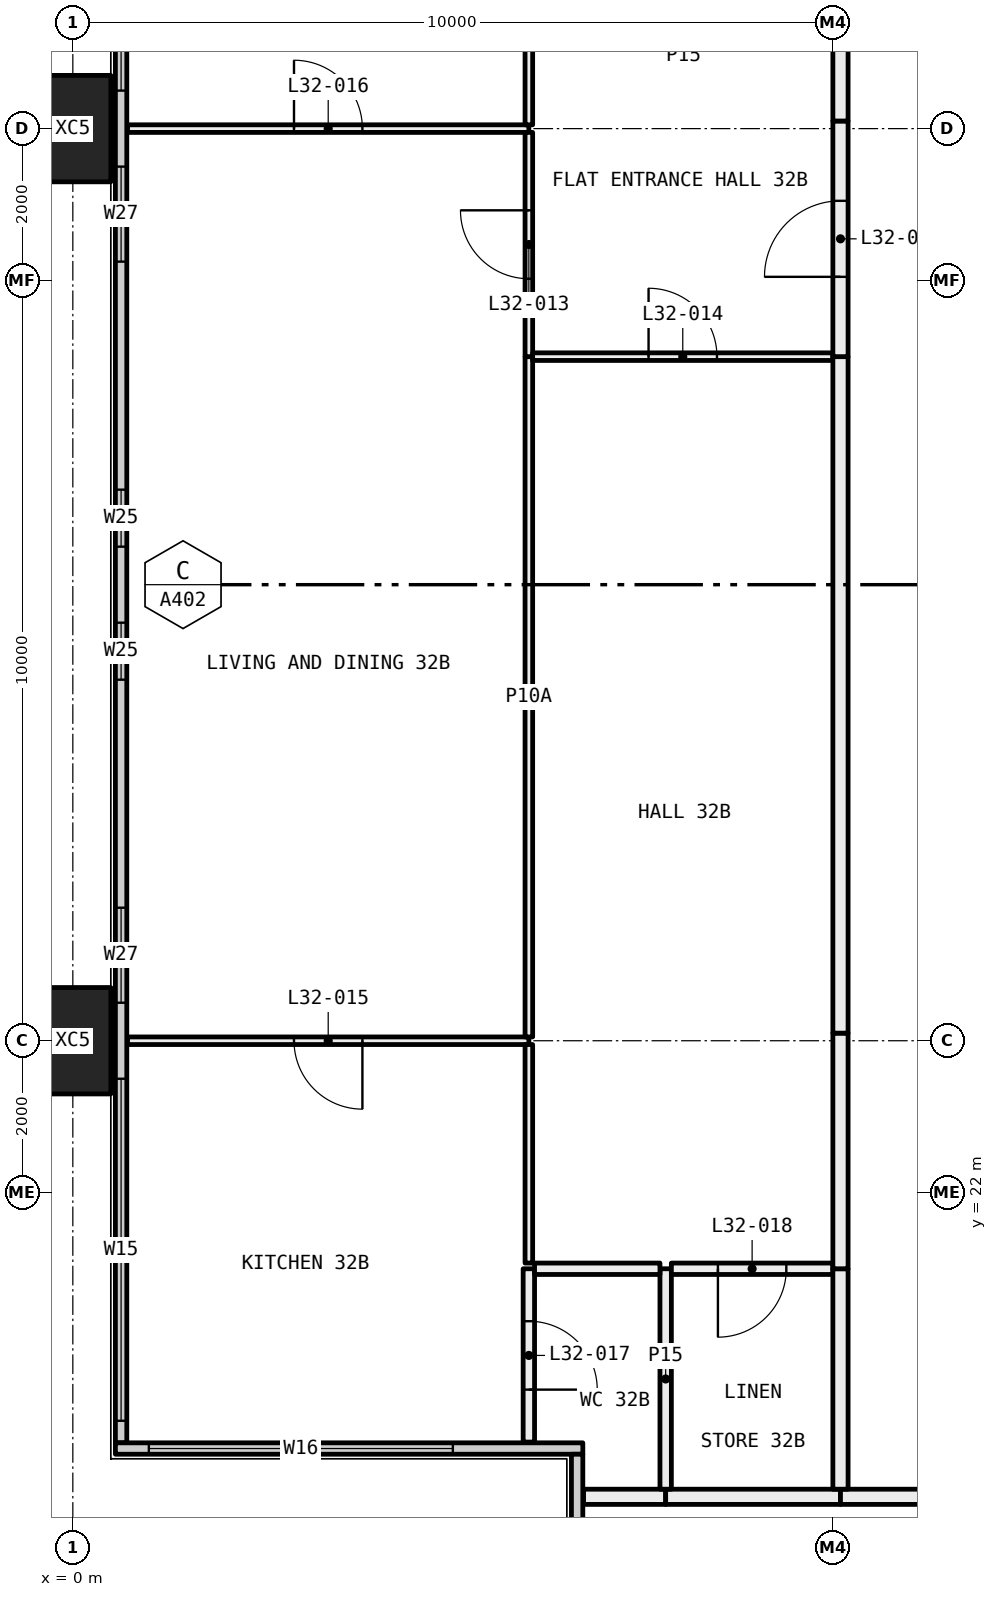
"""IFC4 building model, lengths in metres.
Left out: names, types, materials, properties, quantities, classifications, styles, units other than length and angle.
Written with IfcOpenShell. Run it as: python <this file> out.ifc"""

import sys

from ifc_helpers import new_model, si_unit, direction, frame, frame_2d, origin, origin_2d, place, context, subcontext, project, spatial, rectangle, hollow_rectangle, extrude, element, fill, save


model = new_model("IFC4")
c1 = context("Model", 3, precision=1e-05, world=origin(), true_north=direction((0.0, 1.0)))
c2 = subcontext(c1, "Body", "Model", "MODEL_VIEW")
j1 = project(units=[si_unit("LENGTHUNIT", "METRE"), si_unit("PLANEANGLEUNIT", "RADIAN")], contexts=[c1])
p1 = place(None, origin())
s1 = spatial("IfcSite", under=j1, at=p1, CompositionType="ELEMENT")
p2 = place(p1, origin())
s2 = spatial("IfcBuilding", under=s1, at=p2, CompositionType="ELEMENT")
p3 = place(p2, frame((0.0, 0.0, 124.2)))
s3 = spatial("IfcBuildingStorey", under=s2, at=p3, CompositionType="ELEMENT", Elevation=124.2)
for number, where, z_axis, x_axis in (
    (1, (0.0, 24.0, -0.4), (0.0, 0.0, 1.0), (0.0, 1.0, 0.0)),
    (2, (0.0, 36.0, -0.4), (0.0, 0.0, 1.0), (0.0, 1.0, 0.0)),
):
    element("IfcColumn", number, at=place(p3, frame(where, z_axis=z_axis, x_axis=x_axis)), inside=s3, PredefinedType="COLUMN", context=c2, shape_type="SweptSolid", body=[
        extrude(hollow_rectangle(XDim=1.4, YDim=1.0, WallThickness=0.055, at=origin_2d()), origin(), (0.0, 0.0, 1.0), 3.45),
    ])
p4 = place(p3, frame((0.635, 18.71, 0.0), z_axis=(0.0, 0.0, 1.0), x_axis=(0.0, 1.0, 0.0)))
e3 = element("IfcWall", 3, at=p4, inside=s3, PredefinedType="ELEMENTEDWALL", context=c2, shape_type="SweptSolid", body=[
    extrude(rectangle(XDim=22.58, YDim=0.15, at=frame_2d((11.29, 0.0))), origin(), (0.0, 0.0, 1.0), 3.05),
])
p5 = place(p4, frame((0.29, 0.0, 0.45)))
e4 = element("IfcOpeningElement", 4, at=p5, cuts=e3, PredefinedType="OPENING", context=c2, shape_type="SweptSolid", body=[
    extrude(rectangle(XDim=4.5, YDim=2.55, at=frame_2d((2.25, 1.275))), frame((0.0, 0.085, 0.0), z_axis=(0.0, -1.0, 0.0), x_axis=(1.0, 0.0, 0.0)), (0.0, 0.0, 1.0), 0.17),
])
p6 = place(p4, frame((5.79, 0.0, 0.45)))
e5 = element("IfcOpeningElement", 5, at=p6, cuts=e3, PredefinedType="OPENING", context=c2, shape_type="SweptSolid", body=[
    extrude(rectangle(XDim=1.25, YDim=2.55, at=frame_2d((0.625, 1.275))), frame((0.0, 0.085, 0.0), z_axis=(0.0, -1.0, 0.0), x_axis=(1.0, 0.0, 0.0)), (0.0, 0.0, 1.0), 0.17),
])
p7 = place(p4, frame((10.04, 0.0, 0.45)))
e6 = element("IfcOpeningElement", 6, at=p7, cuts=e3, PredefinedType="OPENING", context=c2, shape_type="SweptSolid", body=[
    extrude(rectangle(XDim=0.75, YDim=2.55, at=frame_2d((0.375, 1.275))), frame((0.0, 0.085, 0.0), z_axis=(0.0, -1.0, 0.0), x_axis=(1.0, 0.0, 0.0)), (0.0, 0.0, 1.0), 0.17),
])
p8 = place(p4, frame((11.79, 0.0, 0.45)))
e7 = element("IfcOpeningElement", 7, at=p8, cuts=e3, PredefinedType="OPENING", context=c2, shape_type="SweptSolid", body=[
    extrude(rectangle(XDim=0.75, YDim=2.55, at=frame_2d((0.375, 1.275))), frame((0.0, 0.085, 0.0), z_axis=(0.0, -1.0, 0.0), x_axis=(1.0, 0.0, 0.0)), (0.0, 0.0, 1.0), 0.17),
])
p9 = place(p4, frame((15.54, 0.0, 0.45)))
e8 = element("IfcOpeningElement", 8, at=p9, cuts=e3, PredefinedType="OPENING", context=c2, shape_type="SweptSolid", body=[
    extrude(rectangle(XDim=1.25, YDim=2.55, at=frame_2d((0.625, 1.275))), frame((0.0, 0.085, 0.0), z_axis=(0.0, -1.0, 0.0), x_axis=(1.0, 0.0, 0.0)), (0.0, 0.0, 1.0), 0.17),
])
p10 = place(p4, frame((17.79, 0.0, 0.45)))
e9 = element("IfcOpeningElement", 9, at=p10, cuts=e3, PredefinedType="OPENING", context=c2, shape_type="SweptSolid", body=[
    extrude(rectangle(XDim=4.5, YDim=2.55, at=frame_2d((2.25, 1.275))), frame((0.0, 0.085, 0.0), z_axis=(0.0, -1.0, 0.0), x_axis=(1.0, 0.0, 0.0)), (0.0, 0.0, 1.0), 0.17),
])
p11 = place(p3, frame((0.56, 18.635, 0.0), z_axis=(0.0, 0.0, 1.0), x_axis=(1.0, 0.0, 0.0)))
e10 = element("IfcWall", 10, at=p11, inside=s3, PredefinedType="ELEMENTEDWALL", context=c2, shape_type="SweptSolid", body=[
    extrude(rectangle(XDim=6.15, YDim=0.15, at=frame_2d((3.075, 0.0))), origin(), (0.0, 0.0, 1.0), 3.05),
])
p12 = place(p11, frame((0.44, 0.0, 0.45)))
e11 = element("IfcOpeningElement", 11, at=p12, cuts=e10, PredefinedType="OPENING", context=c2, shape_type="SweptSolid", body=[
    extrude(rectangle(XDim=4.0, YDim=2.55, at=frame_2d((2.0, 1.275))), frame((0.0, 0.085, 0.0), z_axis=(0.0, -1.0, 0.0), x_axis=(1.0, 0.0, 0.0)), (0.0, 0.0, 1.0), 0.17),
])
p13 = place(p3, frame((6.635, 12.71, 0.0), z_axis=(0.0, 0.0, 1.0), x_axis=(0.0, 1.0, 0.0)))
e12 = element("IfcWall", 12, at=p13, inside=s3, PredefinedType="ELEMENTEDWALL", context=c2, shape_type="SweptSolid", body=[
    extrude(rectangle(XDim=5.85, YDim=0.15, at=frame_2d((2.925, 0.0))), origin(), (0.0, 0.0, 1.0), 3.05),
])
p14 = place(p13, frame((0.29, 0.0, 0.45)))
e13 = element("IfcOpeningElement", 13, at=p14, cuts=e12, PredefinedType="OPENING", context=c2, shape_type="SweptSolid", body=[
    extrude(rectangle(XDim=4.0, YDim=2.55, at=frame_2d((2.0, 1.275))), frame((0.0, 0.085, 0.0), z_axis=(0.0, -1.0, 0.0), x_axis=(1.0, 0.0, 0.0)), (0.0, 0.0, 1.0), 0.17),
])
p15 = place(p3, frame((7.8, 18.0, 0.0), z_axis=(0.0, 0.0, 1.0), x_axis=(-1.0, 0.0, 0.0)))
e14 = element("IfcWall", 14, at=p15, inside=s3, PredefinedType="PARTITIONING", context=c2, shape_type="SweptSolid", body=[
    extrude(rectangle(XDim=1.08, YDim=0.2, at=frame_2d((0.54, 0.0))), origin(), (0.0, 0.0, 1.0), 3.05),
])
p16 = place(p3, frame((10.1, 18.0, 0.0), z_axis=(0.0, 0.0, 1.0), x_axis=(-1.0, 0.0, 0.0)))
e15 = element("IfcWall", 15, at=p16, inside=s3, PredefinedType="PARTITIONING", context=c2, shape_type="SweptSolid", body=[
    extrude(rectangle(XDim=2.3, YDim=0.2, at=frame_2d((1.15, 0.0))), origin(), (0.0, 0.0, 1.0), 3.05),
])
p17 = place(p3, frame((12.0, 18.0, 0.0), z_axis=(0.0, 0.0, 1.0), x_axis=(-1.0, 0.0, 0.0)))
e16 = element("IfcWall", 16, at=p17, inside=s3, PredefinedType="PARTITIONING", context=c2, shape_type="SweptSolid", body=[
    extrude(rectangle(XDim=1.9, YDim=0.2, at=frame_2d((0.95, 0.0))), origin(), (0.0, 0.0, 1.0), 3.05),
])
p18 = place(p3, frame((6.0, 24.0, 0.0), z_axis=(0.0, 0.0, 1.0), x_axis=(-1.0, 0.0, 0.0)))
e17 = element("IfcWall", 17, at=p18, inside=s3, PredefinedType="PARTITIONING", context=c2, shape_type="SweptSolid", body=[
    extrude(rectangle(XDim=5.28, YDim=0.1, at=frame_2d((2.64, 0.0))), origin(), (0.0, 0.0, 1.0), 2.45),
])
p19 = place(p18, frame((2.19, 0.0, 0.0)))
e18 = element("IfcOpeningElement", 18, at=p19, cuts=e17, PredefinedType="OPENING", context=c2, shape_type="SweptSolid", body=[
    extrude(rectangle(XDim=0.9, YDim=2.1, at=frame_2d((0.45, 1.05))), frame((0.0, 0.06, 0.0), z_axis=(0.0, -1.0, 0.0), x_axis=(1.0, 0.0, 0.0)), (0.0, 0.0, 1.0), 0.12),
])
p20 = place(p3, frame((6.0, 18.72, 0.0), z_axis=(0.0, 0.0, 1.0), x_axis=(0.0, 1.0, 0.0)))
e19 = element("IfcWall", 19, at=p20, inside=s3, PredefinedType="PARTITIONING", context=c2, shape_type="SweptSolid", body=[
    extrude(rectangle(XDim=2.28, YDim=0.15, at=frame_2d((1.14, 0.0))), origin(), (0.0, 0.0, 1.0), 3.05),
])
p21 = place(p20, frame((0.69, 0.0, 0.0)))
e20 = element("IfcOpeningElement", 20, at=p21, cuts=e19, PredefinedType="OPENING", context=c2, shape_type="SweptSolid", body=[
    extrude(rectangle(XDim=0.9, YDim=2.1, at=frame_2d((0.45, 1.05))), frame((0.0, 0.085, 0.0), z_axis=(0.0, -1.0, 0.0), x_axis=(1.0, 0.0, 0.0)), (0.0, 0.0, 1.0), 0.17),
])
p22 = place(p3, frame((6.0, 21.075, 0.0), z_axis=(0.0, 0.0, 1.0), x_axis=(0.0, 1.0, 0.0)))
e21 = element("IfcWall", 21, at=p22, inside=s3, PredefinedType="PARTITIONING", context=c2, shape_type="SweptSolid", body=[
    extrude(rectangle(XDim=2.875, YDim=0.1, at=frame_2d((1.438, 0.0))), origin(), (0.0, 0.0, 1.0), 2.45),
])
p23 = place(p3, frame((6.0, 36.0, 0.0), z_axis=(0.0, 0.0, 1.0), x_axis=(-1.0, 0.0, 0.0)))
e22 = element("IfcWall", 22, at=p23, inside=s3, PredefinedType="PARTITIONING", context=c2, shape_type="SweptSolid", body=[
    extrude(rectangle(XDim=5.28, YDim=0.1, at=frame_2d((2.64, 0.0))), origin(), (0.0, 0.0, 1.0), 2.45),
])
p24 = place(p23, frame((2.19, 0.0, 0.0)))
e23 = element("IfcOpeningElement", 23, at=p24, cuts=e22, PredefinedType="OPENING", context=c2, shape_type="SweptSolid", body=[
    extrude(rectangle(XDim=0.9, YDim=2.1, at=frame_2d((0.45, 1.05))), frame((0.0, 0.06, 0.0), z_axis=(0.0, -1.0, 0.0), x_axis=(1.0, 0.0, 0.0)), (0.0, 0.0, 1.0), 0.12),
])
p25 = place(p3, frame((6.0, 24.05, 0.0), z_axis=(0.0, 0.0, 1.0), x_axis=(0.0, 1.0, 0.0)))
e24 = element("IfcWall", 24, at=p25, inside=s3, PredefinedType="PARTITIONING", context=c2, shape_type="SweptSolid", body=[
    extrude(rectangle(XDim=8.95, YDim=0.1, at=frame_2d((4.475, 0.0))), origin(), (0.0, 0.0, 1.0), 2.45),
])
p26 = place(p3, frame((6.0, 33.0, 0.0), z_axis=(0.0, 0.0, 1.0), x_axis=(0.0, 1.0, 0.0)))
e25 = element("IfcWall", 25, at=p26, inside=s3, PredefinedType="PARTITIONING", context=c2, shape_type="SweptSolid", body=[
    extrude(rectangle(XDim=2.95, YDim=0.1, at=frame_2d((1.475, 0.0))), origin(), (0.0, 0.0, 1.0), 2.45),
])
p27 = place(p26, frame((1.025, 0.0, 0.0)))
e26 = element("IfcOpeningElement", 26, at=p27, cuts=e25, PredefinedType="OPENING", context=c2, shape_type="SweptSolid", body=[
    extrude(rectangle(XDim=0.9, YDim=2.1, at=frame_2d((0.45, 1.05))), frame((0.0, 0.06, 0.0), z_axis=(0.0, -1.0, 0.0), x_axis=(1.0, 0.0, 0.0)), (0.0, 0.0, 1.0), 0.12),
])
p28 = place(p3, frame((6.0, 36.05, 0.0), z_axis=(0.0, 0.0, 1.0), x_axis=(0.0, 1.0, 0.0)))
e27 = element("IfcWall", 27, at=p28, inside=s3, PredefinedType="PARTITIONING", context=c2, shape_type="SweptSolid", body=[
    extrude(rectangle(XDim=1.375, YDim=0.1, at=frame_2d((0.688, 0.0))), origin(), (0.0, 0.0, 1.0), 2.45),
])
p29 = place(p3, frame((7.8, 18.1, 0.0), z_axis=(0.0, 0.0, 1.0), x_axis=(0.0, 1.0, 0.0)))
e28 = element("IfcWall", 28, at=p29, inside=s3, PredefinedType="PARTITIONING", context=c2, shape_type="SweptSolid", body=[
    extrude(rectangle(XDim=2.9, YDim=0.15, at=frame_2d((1.45, 0.0))), origin(), (0.0, 0.0, 1.0), 3.05),
])
p30 = place(p3, frame((7.725, 21.0, 0.0), z_axis=(0.0, 0.0, 1.0), x_axis=(-1.0, 0.0, 0.0)))
e29 = element("IfcWall", 29, at=p30, inside=s3, PredefinedType="PARTITIONING", context=c2, shape_type="SweptSolid", body=[
    extrude(rectangle(XDim=1.65, YDim=0.15, at=frame_2d((0.825, 0.0))), origin(), (0.0, 0.0, 1.0), 3.05),
])
p31 = place(p3, frame((10.0, 21.0, 0.0), z_axis=(0.0, 0.0, 1.0), x_axis=(-1.0, 0.0, 0.0)))
e30 = element("IfcWall", 30, at=p31, inside=s3, PredefinedType="PARTITIONING", context=c2, shape_type="SweptSolid", body=[
    extrude(rectangle(XDim=2.125, YDim=0.15, at=frame_2d((1.062, 0.0))), origin(), (0.0, 0.0, 1.0), 3.05),
])
p32 = place(p31, frame((0.613, 0.0, 0.0)))
e31 = element("IfcOpeningElement", 31, at=p32, cuts=e30, PredefinedType="OPENING", context=c2, shape_type="SweptSolid", body=[
    extrude(rectangle(XDim=0.9, YDim=2.1, at=frame_2d((0.45, 1.05))), frame((0.0, 0.085, 0.0), z_axis=(0.0, -1.0, 0.0), x_axis=(1.0, 0.0, 0.0)), (0.0, 0.0, 1.0), 0.17),
])
p33 = place(p3, frame((10.1, 18.1, 0.0), z_axis=(0.0, 0.0, 1.0), x_axis=(0.0, 1.0, 0.0)))
e32 = element("IfcWall", 32, at=p33, inside=s3, PredefinedType="PARTITIONING", context=c2, shape_type="SweptSolid", body=[
    extrude(rectangle(XDim=2.9, YDim=0.2, at=frame_2d((1.45, 0.0))), origin(), (0.0, 0.0, 1.0), 3.05),
])
p34 = place(p3, frame((10.0, 33.0, 0.0), z_axis=(0.0, 0.0, 1.0), x_axis=(-1.0, 0.0, 0.0)))
e33 = element("IfcWall", 33, at=p34, inside=s3, PredefinedType="PARTITIONING", context=c2, shape_type="SweptSolid", body=[
    extrude(rectangle(XDim=3.95, YDim=0.1, at=frame_2d((1.975, 0.0))), origin(), (0.0, 0.0, 1.0), 3.05),
])
p35 = place(p34, frame((1.525, 0.0, 0.0)))
e34 = element("IfcOpeningElement", 34, at=p35, cuts=e33, PredefinedType="OPENING", context=c2, shape_type="SweptSolid", body=[
    extrude(rectangle(XDim=0.9, YDim=2.1, at=frame_2d((0.45, 1.05))), frame((0.0, 0.06, 0.0), z_axis=(0.0, -1.0, 0.0), x_axis=(1.0, 0.0, 0.0)), (0.0, 0.0, 1.0), 0.12),
])
p36 = place(p3, frame((10.1, 21.0, 0.0), z_axis=(0.0, 0.0, 1.0), x_axis=(0.0, 1.0, 0.0)))
e35 = element("IfcWall", 35, at=p36, inside=s3, PredefinedType="PARTITIONING", context=c2, shape_type="SweptSolid", body=[
    extrude(rectangle(XDim=3.1, YDim=0.2, at=frame_2d((1.55, 0.0))), origin(), (0.0, 0.0, 1.0), 2.45),
])
p37 = place(p3, frame((10.1, 24.1, 0.0), z_axis=(0.0, 0.0, 1.0), x_axis=(0.0, 1.0, 0.0)))
e36 = element("IfcWall", 36, at=p37, inside=s3, PredefinedType="PARTITIONING", context=c2, shape_type="SweptSolid", body=[
    extrude(rectangle(XDim=8.9, YDim=0.2, at=frame_2d((4.45, 0.0))), origin(), (0.0, 0.0, 1.0), 3.05),
])
p38 = place(p3, frame((10.1, 33.0, 0.0), z_axis=(0.0, 0.0, 1.0), x_axis=(0.0, 1.0, 0.0)))
e37 = element("IfcWall", 37, at=p38, inside=s3, PredefinedType="PARTITIONING", context=c2, shape_type="SweptSolid", body=[
    extrude(rectangle(XDim=3.1, YDim=0.2, at=frame_2d((1.55, 0.0))), origin(), (0.0, 0.0, 1.0), 2.45),
])
p39 = place(p38, frame((1.05, 0.0, 0.0)))
e38 = element("IfcOpeningElement", 38, at=p39, cuts=e37, PredefinedType="OPENING", context=c2, shape_type="SweptSolid", body=[
    extrude(rectangle(XDim=1.0, YDim=2.1, at=frame_2d((0.5, 1.05))), frame((0.0, 0.11, 0.0), z_axis=(0.0, -1.0, 0.0), x_axis=(1.0, 0.0, 0.0)), (0.0, 0.0, 1.0), 0.22),
])
p40 = place(p3, frame((10.1, 36.1, 0.0), z_axis=(0.0, 0.0, 1.0), x_axis=(0.0, 1.0, 0.0)))
e39 = element("IfcWall", 39, at=p40, inside=s3, PredefinedType="PARTITIONING", context=c2, shape_type="SweptSolid", body=[
    extrude(rectangle(XDim=1.4, YDim=0.2, at=frame_2d((0.7, 0.0))), origin(), (0.0, 0.0, 1.0), 3.05),
])
p41 = place(p5, origin())
e40 = element("IfcWindow", 40, at=p41, inside=s3, PartitioningType="SINGLE_PANEL", PredefinedType="WINDOW", context=c2, shape_type="SweptSolid", body=[
    extrude(rectangle(XDim=4.5, YDim=2.55, at=frame_2d((2.25, 1.275))), frame((0.0, 0.03, 0.0), z_axis=(0.0, -1.0, 0.0), x_axis=(1.0, 0.0, 0.0)), (0.0, 0.0, 1.0), 0.06),
])
fill(e4, e40)
p42 = place(p6, origin())
e41 = element("IfcWindow", 41, at=p42, inside=s3, PartitioningType="SINGLE_PANEL", PredefinedType="WINDOW", context=c2, shape_type="SweptSolid", body=[
    extrude(rectangle(XDim=1.25, YDim=2.55, at=frame_2d((0.625, 1.275))), frame((0.0, 0.03, 0.0), z_axis=(0.0, -1.0, 0.0), x_axis=(1.0, 0.0, 0.0)), (0.0, 0.0, 1.0), 0.06),
])
fill(e5, e41)
p43 = place(p7, origin())
e42 = element("IfcWindow", 42, at=p43, inside=s3, PartitioningType="SINGLE_PANEL", PredefinedType="WINDOW", context=c2, shape_type="SweptSolid", body=[
    extrude(rectangle(XDim=0.75, YDim=2.55, at=frame_2d((0.375, 1.275))), frame((0.0, 0.03, 0.0), z_axis=(0.0, -1.0, 0.0), x_axis=(1.0, 0.0, 0.0)), (0.0, 0.0, 1.0), 0.06),
])
fill(e6, e42)
p44 = place(p8, origin())
e43 = element("IfcWindow", 43, at=p44, inside=s3, PartitioningType="SINGLE_PANEL", PredefinedType="WINDOW", context=c2, shape_type="SweptSolid", body=[
    extrude(rectangle(XDim=0.75, YDim=2.55, at=frame_2d((0.375, 1.275))), frame((0.0, 0.03, 0.0), z_axis=(0.0, -1.0, 0.0), x_axis=(1.0, 0.0, 0.0)), (0.0, 0.0, 1.0), 0.06),
])
fill(e7, e43)
p45 = place(p9, origin())
e44 = element("IfcWindow", 44, at=p45, inside=s3, PartitioningType="SINGLE_PANEL", PredefinedType="WINDOW", context=c2, shape_type="SweptSolid", body=[
    extrude(rectangle(XDim=1.25, YDim=2.55, at=frame_2d((0.625, 1.275))), frame((0.0, 0.03, 0.0), z_axis=(0.0, -1.0, 0.0), x_axis=(1.0, 0.0, 0.0)), (0.0, 0.0, 1.0), 0.06),
])
fill(e8, e44)
p46 = place(p10, origin())
e45 = element("IfcWindow", 45, at=p46, inside=s3, PartitioningType="SINGLE_PANEL", PredefinedType="WINDOW", context=c2, shape_type="SweptSolid", body=[
    extrude(rectangle(XDim=4.5, YDim=2.55, at=frame_2d((2.25, 1.275))), frame((0.0, 0.03, 0.0), z_axis=(0.0, -1.0, 0.0), x_axis=(1.0, 0.0, 0.0)), (0.0, 0.0, 1.0), 0.06),
])
fill(e9, e45)
p47 = place(p12, origin())
e46 = element("IfcWindow", 46, at=p47, inside=s3, PartitioningType="SINGLE_PANEL", PredefinedType="WINDOW", context=c2, shape_type="SweptSolid", body=[
    extrude(rectangle(XDim=4.0, YDim=2.55, at=frame_2d((2.0, 1.275))), frame((0.0, 0.03, 0.0), z_axis=(0.0, -1.0, 0.0), x_axis=(1.0, 0.0, 0.0)), (0.0, 0.0, 1.0), 0.06),
])
fill(e11, e46)
p48 = place(p39, origin())
e47 = element("IfcDoor", 47, at=p48, inside=s3, OperationType="SINGLE_SWING_RIGHT", PredefinedType="DOOR", context=c2, shape_type="SweptSolid", body=[
    extrude(rectangle(XDim=1.0, YDim=2.1, at=frame_2d((0.5, 1.05))), frame((0.0, 0.025, 0.0), z_axis=(0.0, -1.0, 0.0), x_axis=(1.0, 0.0, 0.0)), (0.0, 0.0, 1.0), 0.05),
])
fill(e38, e47)
p49 = place(p27, origin())
e48 = element("IfcDoor", 48, at=p49, inside=s3, OperationType="SINGLE_SWING_LEFT", PredefinedType="DOOR", context=c2, shape_type="SweptSolid", body=[
    extrude(rectangle(XDim=0.9, YDim=2.1, at=frame_2d((0.45, 1.05))), frame((0.0, 0.025, 0.0), z_axis=(0.0, -1.0, 0.0), x_axis=(1.0, 0.0, 0.0)), (0.0, 0.0, 1.0), 0.05),
])
fill(e26, e48)
p50 = place(p35, frame((0.9, 0.0, 0.0), x_axis=(-1.0, 0.0, 0.0)))
e49 = element("IfcDoor", 49, at=p50, inside=s3, OperationType="SINGLE_SWING_RIGHT", PredefinedType="DOOR", context=c2, shape_type="SweptSolid", body=[
    extrude(rectangle(XDim=0.9, YDim=2.1, at=frame_2d((0.45, 1.05))), frame((0.0, 0.025, 0.0), z_axis=(0.0, -1.0, 0.0), x_axis=(1.0, 0.0, 0.0)), (0.0, 0.0, 1.0), 0.05),
])
fill(e34, e49)
p51 = place(p19, origin())
e50 = element("IfcDoor", 50, at=p51, inside=s3, OperationType="SINGLE_SWING_RIGHT", PredefinedType="DOOR", context=c2, shape_type="SweptSolid", body=[
    extrude(rectangle(XDim=0.9, YDim=2.1, at=frame_2d((0.45, 1.05))), frame((0.0, 0.025, 0.0), z_axis=(0.0, -1.0, 0.0), x_axis=(1.0, 0.0, 0.0)), (0.0, 0.0, 1.0), 0.05),
])
fill(e18, e50)
p52 = place(p24, frame((0.9, 0.0, 0.0), x_axis=(-1.0, 0.0, 0.0)))
e51 = element("IfcDoor", 51, at=p52, inside=s3, OperationType="SINGLE_SWING_RIGHT", PredefinedType="DOOR", context=c2, shape_type="SweptSolid", body=[
    extrude(rectangle(XDim=0.9, YDim=2.1, at=frame_2d((0.45, 1.05))), frame((0.0, 0.025, 0.0), z_axis=(0.0, -1.0, 0.0), x_axis=(1.0, 0.0, 0.0)), (0.0, 0.0, 1.0), 0.05),
])
fill(e23, e51)
p53 = place(p21, frame((0.9, 0.0, 0.0), x_axis=(-1.0, 0.0, 0.0)))
e52 = element("IfcDoor", 52, at=p53, inside=s3, OperationType="SINGLE_SWING_LEFT", PredefinedType="DOOR", context=c2, shape_type="SweptSolid", body=[
    extrude(rectangle(XDim=0.9, YDim=2.1, at=frame_2d((0.45, 1.05))), frame((0.0, 0.025, 0.0), z_axis=(0.0, -1.0, 0.0), x_axis=(1.0, 0.0, 0.0)), (0.0, 0.0, 1.0), 0.05),
])
fill(e20, e52)
p54 = place(p32, origin())
e53 = element("IfcDoor", 53, at=p54, inside=s3, OperationType="SINGLE_SWING_LEFT", PredefinedType="DOOR", context=c2, shape_type="SweptSolid", body=[
    extrude(rectangle(XDim=0.9, YDim=2.1, at=frame_2d((0.45, 1.05))), frame((0.0, 0.025, 0.0), z_axis=(0.0, -1.0, 0.0), x_axis=(1.0, 0.0, 0.0)), (0.0, 0.0, 1.0), 0.05),
])
fill(e31, e53)
save(model, sys.argv[1])
